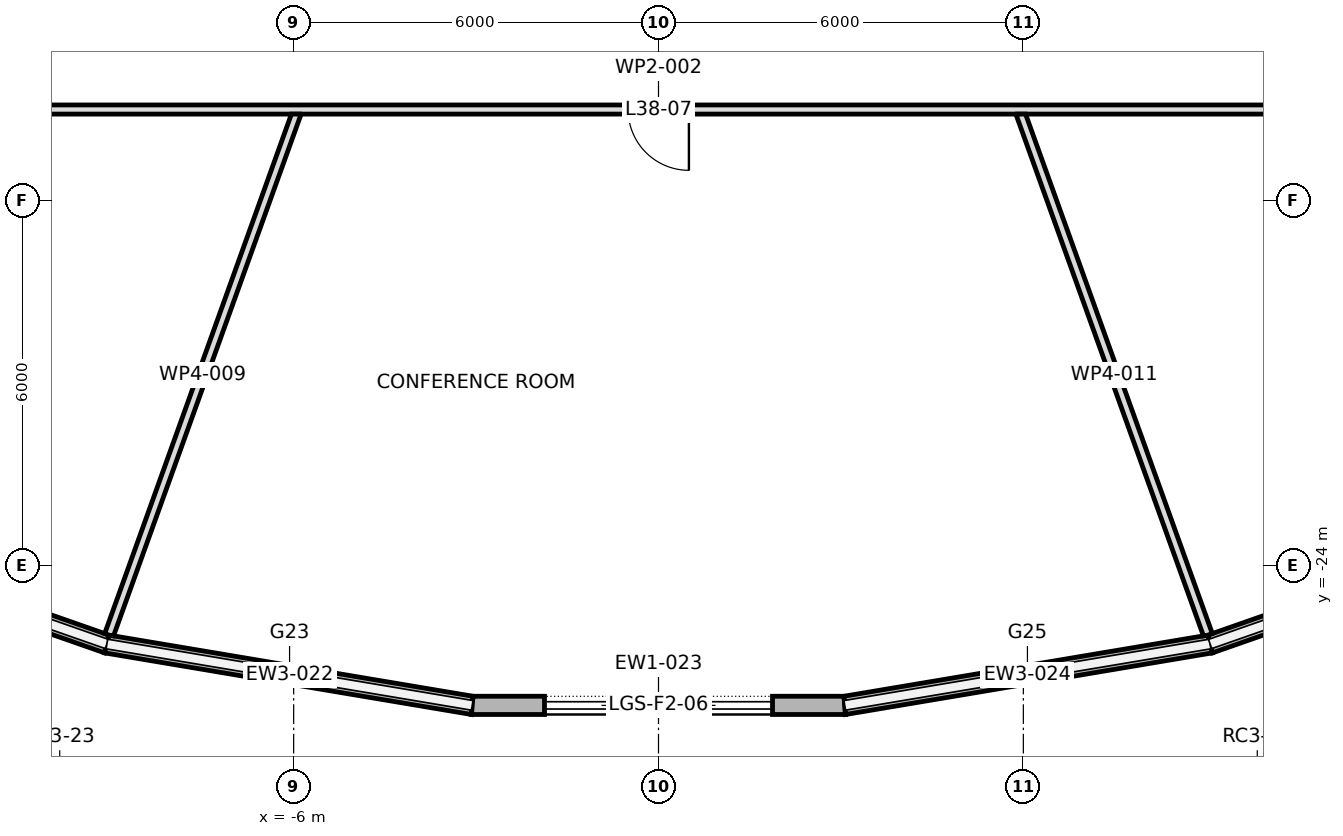
"""IFC4 building model, lengths in metres.
Left out: names, types, materials, properties, quantities, classifications, styles, units other than length and angle.
Written with IfcOpenShell. Run it as: python <this file> out.ifc"""

import sys

from ifc_helpers import new_model, si_unit, direction, frame, frame_2d, origin, place, context, subcontext, project, spatial, polyline, rectangle, outline, extrude, element, fill, save


model = new_model("IFC4")
c1 = context("Model", 3, precision=1e-05, world=origin(), true_north=direction((0.0, 1.0)))
c2 = subcontext(c1, "Body", "Model", "MODEL_VIEW")
j1 = project(units=[si_unit("LENGTHUNIT", "METRE"), si_unit("PLANEANGLEUNIT", "RADIAN")], contexts=[c1])
p1 = place(None, origin())
s1 = spatial("IfcSite", under=j1, at=p1, CompositionType="ELEMENT")
p2 = place(p1, origin())
s2 = spatial("IfcBuilding", under=s1, at=p2, CompositionType="ELEMENT")
p3 = place(p2, frame((0.0, 0.0, 167.5)))
s3 = spatial("IfcBuildingStorey", under=s2, at=p3, CompositionType="ELEMENT", Elevation=167.5)
p4 = place(p3, frame((-14.732, -23.31, 5.2), z_axis=(0.0, 0.0, 1.0), x_axis=(0.943944636678, -0.330103806228, 0.0)))
e1 = element("IfcWall", 1, at=p4, inside=s3, PredefinedType="STANDARD", context=c2, shape_type="SweptSolid", body=[
    extrude(outline(polyline([(-0.013, -0.15), (6.01, -0.15), (5.985, 0.15), (0.013, 0.15), (-0.013, -0.15)])), origin(), (0.0, 0.0, 1.0), 0.45),
])
p5 = place(p3, frame((-9.071, -25.29, 5.2), z_axis=(0.0, 0.0, 1.0), x_axis=(0.98618955457, -0.165620537547, 0.0)))
e2 = element("IfcWall", 2, at=p5, inside=s3, PredefinedType="STANDARD", context=c2, shape_type="SweptSolid", body=[
    extrude(outline(polyline([(-0.013, -0.15), (6.105, -0.15), (6.08, 0.15), (0.013, 0.15), (-0.013, -0.15)])), origin(), (0.0, 0.0, 1.0), 0.45),
])
p6 = place(p3, frame((-3.063, -26.299, 0.0), z_axis=(0.0, 0.0, 1.0), x_axis=(1.0, 0.0, 0.0)))
e3 = element("IfcWall", 3, at=p6, inside=s3, PredefinedType="STANDARD", context=c2, shape_type="SweptSolid", body=[
    extrude(outline(polyline([(-0.012, -0.15), (6.138, -0.15), (6.114, 0.15), (0.012, 0.15), (-0.012, -0.15)])), origin(), (0.0, 0.0, 1.0), 5.65),
])
p7 = place(p6, frame((1.188, 0.0, 0.0)))
e4 = element("IfcOpeningElement", 4, at=p7, cuts=e3, PredefinedType="OPENING", context=c2, shape_type="SweptSolid", body=[
    extrude(rectangle(XDim=3.75, YDim=5.2, at=frame_2d((1.875, 2.6))), frame((0.0, 0.162, 0.0), z_axis=(0.0, -1.0, 0.0), x_axis=(1.0, 0.0, 0.0)), (0.0, 0.0, 1.0), 0.324),
])
p8 = place(p3, frame((3.063, -26.299, 5.2), z_axis=(0.0, 0.0, 1.0), x_axis=(0.98618955457, 0.165620537547, 0.0)))
e5 = element("IfcWall", 5, at=p8, inside=s3, PredefinedType="STANDARD", context=c2, shape_type="SweptSolid", body=[
    extrude(outline(polyline([(-0.012, -0.15), (6.105, -0.15), (6.08, 0.15), (0.012, 0.15), (-0.012, -0.15)])), origin(), (0.0, 0.0, 1.0), 0.45),
])
p9 = place(p3, frame((9.071, -25.29, 5.2), z_axis=(0.0, 0.0, 1.0), x_axis=(0.943944636678, 0.330103806228, 0.0)))
e6 = element("IfcWall", 6, at=p9, inside=s3, PredefinedType="STANDARD", context=c2, shape_type="SweptSolid", body=[
    extrude(outline(polyline([(-0.013, -0.15), (6.011, -0.15), (5.984, 0.15), (0.013, 0.15), (-0.013, -0.15)])), origin(), (0.0, 0.0, 1.0), 0.45),
])
p10 = place(p3, frame((-16.575, -16.5, 0.0), z_axis=(0.0, 0.0, 1.0), x_axis=(1.0, 0.0, 0.0)))
e7 = element("IfcWall", 7, at=p10, inside=s3, PredefinedType="PARTITIONING", context=c2, shape_type="SweptSolid", body=[
    extrude(outline(polyline([(0.0, -0.075), (1.95, -0.075), (3.9, -0.075), (5.85, -0.075), (7.8, -0.075), (9.75, -0.075), (11.7, -0.075), (13.65, -0.075), (15.6, -0.075), (17.55, -0.075), (19.5, -0.075), (21.45, -0.075), (23.4, -0.075), (25.35, -0.075), (27.3, -0.075), (29.25, -0.075), (31.2, -0.075), (33.15, -0.075), (33.0, 0.075), (31.068, 0.075), (29.135, 0.075), (27.203, 0.075), (25.271, 0.075), (23.338, 0.075), (21.406, 0.075), (19.473, 0.075), (17.541, 0.075), (15.609, 0.075), (13.677, 0.075), (11.744, 0.075), (9.812, 0.075), (7.879, 0.075), (5.947, 0.075), (4.015, 0.075), (2.082, 0.075), (0.15, 0.075), (0.0, -0.075)])), origin(), (0.0, 0.0, 1.0), 5.65),
])
p11 = place(p10, frame((4.46, 0.0, 0.0)))
e8 = element("IfcOpeningElement", 8, at=p11, cuts=e7, PredefinedType="OPENING", context=c2, shape_type="SweptSolid", body=[
    extrude(rectangle(XDim=1.8, YDim=2.1, at=frame_2d((0.9, 1.05))), frame((0.0, 0.087, 0.0), z_axis=(0.0, -1.0, 0.0), x_axis=(1.0, 0.0, 0.0)), (0.0, 0.0, 1.0), 0.174),
])
p12 = place(p10, frame((16.075, 0.0, 0.0)))
e9 = element("IfcOpeningElement", 9, at=p12, cuts=e7, PredefinedType="OPENING", context=c2, shape_type="SweptSolid", body=[
    extrude(rectangle(XDim=1.0, YDim=2.1, at=frame_2d((0.5, 1.05))), frame((0.0, 0.087, 0.0), z_axis=(0.0, -1.0, 0.0), x_axis=(1.0, 0.0, 0.0)), (0.0, 0.0, 1.0), 0.174),
])
p13 = place(p10, frame((26.89, 0.0, 0.0)))
e10 = element("IfcOpeningElement", 10, at=p13, cuts=e7, PredefinedType="OPENING", context=c2, shape_type="SweptSolid", body=[
    extrude(rectangle(XDim=1.8, YDim=2.1, at=frame_2d((0.9, 1.05))), frame((0.0, 0.087, 0.0), z_axis=(0.0, -1.0, 0.0), x_axis=(1.0, 0.0, 0.0)), (0.0, 0.0, 1.0), 0.174),
])
p14 = place(p3, frame((-5.948, -16.55, 0.0), z_axis=(0.0, 0.0, 1.0), x_axis=(-0.338254589268, -0.941054638605, 0.0)))
e11 = element("IfcWall", 11, at=p14, inside=s3, PredefinedType="PARTITIONING", context=c2, shape_type="SweptSolid", body=[
    extrude(outline(polyline([(9.132, -0.075), (9.132, -0.062), (9.131, 0.003), (9.118, 0.075), (7.295, 0.075), (5.471, 0.075), (3.647, 0.075), (1.824, 0.075), (0.0, 0.075), (0.0, 0.074), (0.054, -0.075), (1.869, -0.075), (3.685, -0.075), (5.5, -0.075), (7.316, -0.075), (9.132, -0.075)])), origin(), (0.0, 0.0, 1.0), 4.88),
])
p15 = place(p3, frame((5.948, -16.55, 0.0), z_axis=(0.0, 0.0, 1.0), x_axis=(0.338254589268, -0.941054638605, 0.0)))
e12 = element("IfcWall", 12, at=p15, inside=s3, PredefinedType="PARTITIONING", context=c2, shape_type="SweptSolid", body=[
    extrude(outline(polyline([(0.0, -0.075), (1.824, -0.075), (3.647, -0.075), (5.471, -0.075), (7.295, -0.075), (9.118, -0.075), (9.131, -0.003), (9.132, 0.062), (9.132, 0.075), (7.316, 0.075), (5.5, 0.075), (3.685, 0.075), (1.869, 0.075), (0.054, 0.075), (0.0, -0.074), (0.0, -0.075)])), origin(), (0.0, 0.0, 1.0), 4.88),
])
p16 = place(p7, origin())
e13 = element("IfcDoor", 13, at=p16, inside=s3, OperationType="DOUBLE_DOOR_SLIDING", PredefinedType="DOOR", context=c2, shape_type="SweptSolid", body=[
    extrude(rectangle(XDim=3.75, YDim=5.2, at=frame_2d((1.875, 2.6))), frame((0.0, 0.025, 0.0), z_axis=(0.0, -1.0, 0.0), x_axis=(1.0, 0.0, 0.0)), (0.0, 0.0, 1.0), 0.05),
])
fill(e4, e13)
p17 = place(p12, frame((1.0, 0.0, 0.0), z_axis=(0.0, 0.0, 1.0), x_axis=(-1.0, 0.0, 0.0)))
e14 = element("IfcDoor", 14, at=p17, inside=s3, OperationType="SINGLE_SWING_RIGHT", PredefinedType="DOOR", context=c2, shape_type="SweptSolid", body=[
    extrude(rectangle(XDim=1.0, YDim=2.1, at=frame_2d((0.5, 1.05))), frame((0.0, 0.025, 0.0), z_axis=(0.0, -1.0, 0.0), x_axis=(1.0, 0.0, 0.0)), (0.0, 0.0, 1.0), 0.05),
])
fill(e9, e14)
save(model, sys.argv[1])
